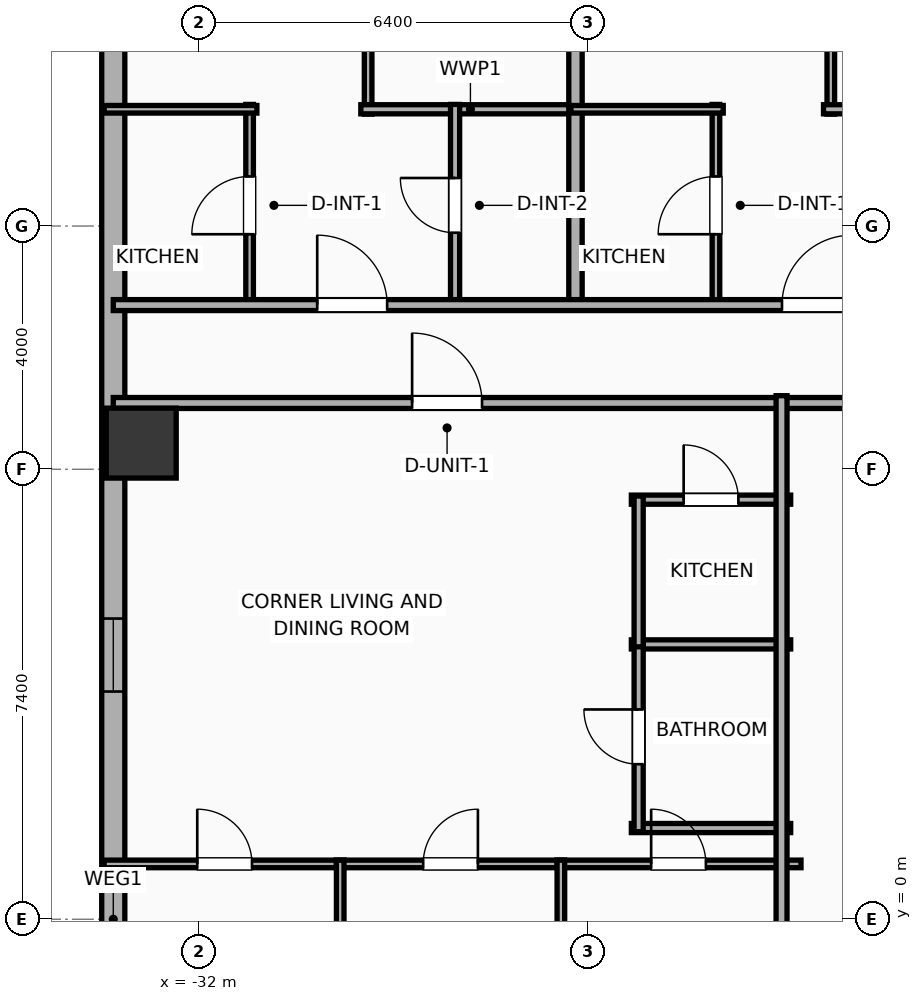
"""IFC4 building model, lengths in metres.
Left out: names, types, materials, properties, quantities, classifications, styles, units other than length and angle.
Written with IfcOpenShell. Run it as: python <this file> out.ifc"""

import sys

from ifc_helpers import new_model, si_unit, direction, frame, frame_2d, origin, origin_2d, place, context, subcontext, project, spatial, rectangle, hollow_rectangle, extrude, element, fill, save


model = new_model("IFC4")
c1 = context("Model", 3, precision=1e-05, world=origin(), true_north=direction((0.0, 1.0)))
c2 = subcontext(c1, "Body", "Model", "MODEL_VIEW")
j1 = project(units=[si_unit("LENGTHUNIT", "METRE"), si_unit("PLANEANGLEUNIT", "RADIAN")], contexts=[c1])
p1 = place(None, origin())
s1 = spatial("IfcSite", under=j1, at=p1, CompositionType="ELEMENT")
p2 = place(p1, origin())
s2 = spatial("IfcBuilding", under=s1, at=p2, CompositionType="ELEMENT")
p3 = place(p2, frame((0.0, 0.0, 45.5)))
s3 = spatial("IfcBuildingStorey", under=s2, at=p3, CompositionType="ELEMENT", Elevation=45.5)
p4 = place(p3, frame((-32.95, 7.83, 0.0), z_axis=(0.0, 0.0, 1.0), x_axis=(1.0, 0.0, 0.0)))
e1 = element("IfcColumn", 1, at=p4, inside=s3, PredefinedType="COLUMN", context=c2, shape_type="SweptSolid", body=[
    extrude(hollow_rectangle(XDim=1.15, YDim=1.15, WallThickness=0.04, at=origin_2d()), origin(), (0.0, 0.0, 1.0), 3.9),
])
p5 = place(p3, frame((-33.41, -18.381, 0.0), z_axis=(0.0, 0.0, 1.0), x_axis=(0.0, 1.0, 0.0)))
e2 = element("IfcWall", 2, at=p5, inside=s3, PredefinedType="ELEMENTEDWALL", context=c2, shape_type="SweptSolid", body=[
    extrude(rectangle(XDim=36.763, YDim=0.38, at=frame_2d((18.381, 0.0))), origin(), (0.0, 0.0, 1.0), 3.65),
])
p6 = place(p5, frame((33.187, 0.0, 0.75)))
e3 = element("IfcOpeningElement", 3, at=p6, cuts=e2, PredefinedType="OPENING", context=c2, shape_type="SweptSolid", body=[
    extrude(rectangle(XDim=1.2, YDim=2.05, at=frame_2d((0.6, 1.025))), frame((0.0, 0.2, 0.0), z_axis=(0.0, -1.0, 0.0), x_axis=(1.0, 0.0, 0.0)), (0.0, 0.0, 1.0), 0.4),
])
p7 = place(p5, frame((22.126, 0.0, 0.75)))
e4 = element("IfcOpeningElement", 4, at=p7, cuts=e2, PredefinedType="OPENING", context=c2, shape_type="SweptSolid", body=[
    extrude(rectangle(XDim=1.2, YDim=2.05, at=frame_2d((0.6, 1.025))), frame((0.0, 0.2, 0.0), z_axis=(0.0, -1.0, 0.0), x_axis=(1.0, 0.0, 0.0)), (0.0, 0.0, 1.0), 0.4),
])
p8 = place(p5, frame((13.576, 0.0, 0.75)))
e5 = element("IfcOpeningElement", 5, at=p8, cuts=e2, PredefinedType="OPENING", context=c2, shape_type="SweptSolid", body=[
    extrude(rectangle(XDim=1.2, YDim=2.05, at=frame_2d((0.6, 1.025))), frame((0.0, 0.2, 0.0), z_axis=(0.0, -1.0, 0.0), x_axis=(1.0, 0.0, 0.0)), (0.0, 0.0, 1.0), 0.4),
])
p9 = place(p3, frame((-33.41, 8.49, 0.0), z_axis=(0.0, 0.0, 1.0), x_axis=(1.0, 0.0, 0.0)))
e6 = element("IfcWall", 6, at=p9, inside=s3, PredefinedType="PARTITIONING", context=c2, shape_type="SweptSolid", body=[
    extrude(rectangle(XDim=23.53, YDim=0.18, at=frame_2d((11.765, 0.0))), origin(), (0.0, 0.0, 1.0), 3.65),
])
p10 = place(p9, frame((4.915, 0.0, 0.0)))
e7 = element("IfcOpeningElement", 7, at=p10, cuts=e6, PredefinedType="OPENING", context=c2, shape_type="SweptSolid", body=[
    extrude(rectangle(XDim=1.15, YDim=2.05, at=frame_2d((0.575, 1.025))), frame((0.0, 0.1, 0.0), z_axis=(0.0, -1.0, 0.0), x_axis=(1.0, 0.0, 0.0)), (0.0, 0.0, 1.0), 0.2),
])
p11 = place(p3, frame((-29.219, 13.24, 0.0), z_axis=(0.0, 0.0, 1.0), x_axis=(0.0, 1.0, 0.0)))
e8 = element("IfcWall", 8, at=p11, inside=s3, PredefinedType="PARTITIONING", context=c2, shape_type="SweptSolid", body=[
    extrude(rectangle(XDim=9.12, YDim=0.125, at=frame_2d((4.56, 0.0))), origin(), (0.0, 0.0, 1.0), 3.65),
])
p12 = place(p11, frame((1.739, 0.0, 0.0)))
e9 = element("IfcOpeningElement", 9, at=p12, cuts=e8, PredefinedType="OPENING", context=c2, shape_type="SweptSolid", body=[
    extrude(rectangle(XDim=0.9, YDim=2.05, at=frame_2d((0.45, 1.025))), frame((0.0, 0.073, 0.0), z_axis=(0.0, -1.0, 0.0), x_axis=(1.0, 0.0, 0.0)), (0.0, 0.0, 1.0), 0.145),
])
p13 = place(p3, frame((-29.339, 13.32, 0.0), z_axis=(0.0, 0.0, 1.0), x_axis=(1.0, 0.0, 0.0)))
e10 = element("IfcWall", 10, at=p13, inside=s3, PredefinedType="PLUMBINGWALL", context=c2, shape_type="SweptSolid", body=[
    extrude(rectangle(XDim=3.605, YDim=0.15, at=frame_2d((1.803, 0.0))), origin(), (0.0, 0.0, 1.0), 3.65),
])
p14 = place(p3, frame((-31.168, 10.08, 0.0), z_axis=(0.0, 0.0, 1.0), x_axis=(0.0, 1.0, 0.0)))
e11 = element("IfcWall", 11, at=p14, inside=s3, PredefinedType="PARTITIONING", context=c2, shape_type="SweptSolid", body=[
    extrude(rectangle(XDim=3.32, YDim=0.125, at=frame_2d((1.66, 0.0))), origin(), (0.0, 0.0, 1.0), 3.65),
])
p15 = place(p14, frame((1.185, 0.0, 0.0)))
e12 = element("IfcOpeningElement", 12, at=p15, cuts=e11, PredefinedType="OPENING", context=c2, shape_type="SweptSolid", body=[
    extrude(rectangle(XDim=0.95, YDim=2.05, at=frame_2d((0.475, 1.025))), frame((0.0, 0.073, 0.0), z_axis=(0.0, -1.0, 0.0), x_axis=(1.0, 0.0, 0.0)), (0.0, 0.0, 1.0), 0.145),
])
p16 = place(p3, frame((-33.56, 13.32, 0.0), z_axis=(0.0, 0.0, 1.0), x_axis=(1.0, 0.0, 0.0)))
e13 = element("IfcWall", 13, at=p16, inside=s3, PredefinedType="PARTITIONING", context=c2, shape_type="SweptSolid", body=[
    extrude(rectangle(XDim=2.512, YDim=0.125, at=frame_2d((1.256, 0.0))), origin(), (0.0, 0.0, 1.0), 3.65),
])
p17 = place(p3, frame((-27.789, 10.08, 0.0), z_axis=(0.0, 0.0, 1.0), x_axis=(0.0, 1.0, 0.0)))
e14 = element("IfcWall", 14, at=p17, inside=s3, PredefinedType="PLUMBINGWALL", context=c2, shape_type="SweptSolid", body=[
    extrude(rectangle(XDim=3.32, YDim=0.15, at=frame_2d((1.66, 0.0))), origin(), (0.0, 0.0, 1.0), 3.65),
])
p18 = place(p17, frame((1.21, 0.0, 0.0)))
e15 = element("IfcOpeningElement", 15, at=p18, cuts=e14, PredefinedType="OPENING", context=c2, shape_type="SweptSolid", body=[
    extrude(rectangle(XDim=0.9, YDim=2.05, at=frame_2d((0.45, 1.025))), frame((0.0, 0.085, 0.0), z_axis=(0.0, -1.0, 0.0), x_axis=(1.0, 0.0, 0.0)), (0.0, 0.0, 1.0), 0.17),
])
p19 = place(p3, frame((-25.809, 10.02, 0.0), z_axis=(0.0, 0.0, 1.0), x_axis=(0.0, 1.0, 0.0)))
e16 = element("IfcWall", 16, at=p19, inside=s3, PredefinedType="PARTITIONING", context=c2, shape_type="SweptSolid", body=[
    extrude(rectangle(XDim=12.19, YDim=0.22, at=frame_2d((6.095, 0.0))), origin(), (0.0, 0.0, 1.0), 3.65),
])
p20 = place(p3, frame((-21.61, 13.24, 0.0), z_axis=(0.0, 0.0, 1.0), x_axis=(0.0, 1.0, 0.0)))
e17 = element("IfcWall", 17, at=p20, inside=s3, PredefinedType="PARTITIONING", context=c2, shape_type="SweptSolid", body=[
    extrude(rectangle(XDim=9.12, YDim=0.125, at=frame_2d((4.56, 0.0))), origin(), (0.0, 0.0, 1.0), 3.65),
])
p21 = place(p20, frame((1.739, 0.0, 0.0)))
e18 = element("IfcOpeningElement", 18, at=p21, cuts=e17, PredefinedType="OPENING", context=c2, shape_type="SweptSolid", body=[
    extrude(rectangle(XDim=0.9, YDim=2.05, at=frame_2d((0.45, 1.025))), frame((0.0, 0.073, 0.0), z_axis=(0.0, -1.0, 0.0), x_axis=(1.0, 0.0, 0.0)), (0.0, 0.0, 1.0), 0.145),
])
p22 = place(p3, frame((-21.73, 13.32, 0.0), z_axis=(0.0, 0.0, 1.0), x_axis=(1.0, 0.0, 0.0)))
e19 = element("IfcWall", 19, at=p22, inside=s3, PredefinedType="PLUMBINGWALL", context=c2, shape_type="SweptSolid", body=[
    extrude(rectangle(XDim=3.605, YDim=0.15, at=frame_2d((1.802, 0.0))), origin(), (0.0, 0.0, 1.0), 3.65),
])
p23 = place(p3, frame((-23.499, 10.08, 0.0), z_axis=(0.0, 0.0, 1.0), x_axis=(0.0, 1.0, 0.0)))
e20 = element("IfcWall", 20, at=p23, inside=s3, PredefinedType="PARTITIONING", context=c2, shape_type="SweptSolid", body=[
    extrude(rectangle(XDim=3.32, YDim=0.125, at=frame_2d((1.66, 0.0))), origin(), (0.0, 0.0, 1.0), 3.65),
])
p24 = place(p23, frame((1.185, 0.0, 0.0)))
e21 = element("IfcOpeningElement", 21, at=p24, cuts=e20, PredefinedType="OPENING", context=c2, shape_type="SweptSolid", body=[
    extrude(rectangle(XDim=0.95, YDim=2.05, at=frame_2d((0.475, 1.025))), frame((0.0, 0.073, 0.0), z_axis=(0.0, -1.0, 0.0), x_axis=(1.0, 0.0, 0.0)), (0.0, 0.0, 1.0), 0.145),
])
p25 = place(p3, frame((-25.884, 13.32, 0.0), z_axis=(0.0, 0.0, 1.0), x_axis=(1.0, 0.0, 0.0)))
e22 = element("IfcWall", 22, at=p25, inside=s3, PredefinedType="PARTITIONING", context=c2, shape_type="SweptSolid", body=[
    extrude(rectangle(XDim=2.505, YDim=0.125, at=frame_2d((1.252, 0.0))), origin(), (0.0, 0.0, 1.0), 3.65),
])
p26 = place(p3, frame((-33.41, 10.1, 0.0), z_axis=(0.0, 0.0, 1.0), x_axis=(1.0, 0.0, 0.0)))
e23 = element("IfcWall", 23, at=p26, inside=s3, PredefinedType="PARTITIONING", context=c2, shape_type="SweptSolid", body=[
    extrude(rectangle(XDim=59.62, YDim=0.18, at=frame_2d((29.81, 0.0))), origin(), (0.0, 0.0, 1.0), 3.65),
])
p27 = place(p26, frame((3.354, 0.0, 0.0)))
e24 = element("IfcOpeningElement", 24, at=p27, cuts=e23, PredefinedType="OPENING", context=c2, shape_type="SweptSolid", body=[
    extrude(rectangle(XDim=1.15, YDim=2.05, at=frame_2d((0.575, 1.025))), frame((0.0, 0.1, 0.0), z_axis=(0.0, -1.0, 0.0), x_axis=(1.0, 0.0, 0.0)), (0.0, 0.0, 1.0), 0.2),
])
p28 = place(p26, frame((10.997, 0.0, 0.0)))
e25 = element("IfcOpeningElement", 25, at=p28, cuts=e23, PredefinedType="OPENING", context=c2, shape_type="SweptSolid", body=[
    extrude(rectangle(XDim=1.15, YDim=2.05, at=frame_2d((0.575, 1.025))), frame((0.0, 0.1, 0.0), z_axis=(0.0, -1.0, 0.0), x_axis=(1.0, 0.0, 0.0)), (0.0, 0.0, 1.0), 0.2),
])
p29 = place(p26, frame((20.232, 0.0, 0.0)))
e26 = element("IfcOpeningElement", 26, at=p29, cuts=e23, PredefinedType="OPENING", context=c2, shape_type="SweptSolid", body=[
    extrude(rectangle(XDim=1.15, YDim=2.05, at=frame_2d((0.575, 1.025))), frame((0.0, 0.1, 0.0), z_axis=(0.0, -1.0, 0.0), x_axis=(1.0, 0.0, 0.0)), (0.0, 0.0, 1.0), 0.2),
])
p30 = place(p26, frame((30.38, 0.0, 0.0)))
e27 = element("IfcOpeningElement", 27, at=p30, cuts=e23, PredefinedType="OPENING", context=c2, shape_type="SweptSolid", body=[
    extrude(rectangle(XDim=1.15, YDim=2.05, at=frame_2d((0.575, 1.025))), frame((0.0, 0.1, 0.0), z_axis=(0.0, -1.0, 0.0), x_axis=(1.0, 0.0, 0.0)), (0.0, 0.0, 1.0), 0.2),
])
p31 = place(p26, frame((40.998, 0.0, 0.0)))
e28 = element("IfcOpeningElement", 28, at=p31, cuts=e23, PredefinedType="OPENING", context=c2, shape_type="SweptSolid", body=[
    extrude(rectangle(XDim=1.15, YDim=2.05, at=frame_2d((0.575, 1.025))), frame((0.0, 0.1, 0.0), z_axis=(0.0, -1.0, 0.0), x_axis=(1.0, 0.0, 0.0)), (0.0, 0.0, 1.0), 0.2),
])
p32 = place(p26, frame((49.428, 0.0, 0.0)))
e29 = element("IfcOpeningElement", 29, at=p32, cuts=e23, PredefinedType="OPENING", context=c2, shape_type="SweptSolid", body=[
    extrude(rectangle(XDim=0.9, YDim=2.05, at=frame_2d((0.45, 1.025))), frame((0.0, 0.1, 0.0), z_axis=(0.0, -1.0, 0.0), x_axis=(1.0, 0.0, 0.0)), (0.0, 0.0, 1.0), 0.2),
])
p33 = place(p26, frame((56.07, 0.0, 0.0)))
e30 = element("IfcOpeningElement", 30, at=p33, cuts=e23, PredefinedType="OPENING", context=c2, shape_type="SweptSolid", body=[
    extrude(rectangle(XDim=0.9, YDim=2.05, at=frame_2d((0.45, 1.025))), frame((0.0, 0.1, 0.0), z_axis=(0.0, -1.0, 0.0), x_axis=(1.0, 0.0, 0.0)), (0.0, 0.0, 1.0), 0.2),
])
p34 = place(p3, frame((-24.89, 6.9, 0.0), z_axis=(0.0, 0.0, 1.0), x_axis=(1.0, 0.0, 0.0)))
e31 = element("IfcWall", 31, at=p34, inside=s3, PredefinedType="PLUMBINGWALL", context=c2, shape_type="SweptSolid", body=[
    extrude(rectangle(XDim=2.62, YDim=0.15, at=frame_2d((1.31, 0.0))), origin(), (0.0, 0.0, 1.0), 3.65),
])
p35 = place(p34, frame((0.86, 0.0, 0.0)))
e32 = element("IfcOpeningElement", 32, at=p35, cuts=e31, PredefinedType="OPENING", context=c2, shape_type="SweptSolid", body=[
    extrude(rectangle(XDim=0.9, YDim=2.05, at=frame_2d((0.45, 1.025))), frame((0.0, 0.085, 0.0), z_axis=(0.0, -1.0, 0.0), x_axis=(1.0, 0.0, 0.0)), (0.0, 0.0, 1.0), 0.17),
])
for number, where, z_axis, x_axis in (
    (33, (-24.89, 4.52, 0.0), (0.0, 0.0, 1.0), (1.0, 0.0, 0.0)),
    (34, (-24.89, 1.5, 0.0), (0.0, 0.0, 1.0), (1.0, 0.0, 0.0)),
):
    element("IfcWall", number, at=place(p3, frame(where, z_axis=z_axis, x_axis=x_axis)), inside=s3, PredefinedType="PLUMBINGWALL", context=c2, shape_type="SweptSolid", body=[
        extrude(rectangle(XDim=2.62, YDim=0.15, at=frame_2d((1.31, 0.0))), origin(), (0.0, 0.0, 1.0), 3.65),
    ])
p36 = place(p3, frame((-24.77, 1.44, 0.0), z_axis=(0.0, 0.0, 1.0), x_axis=(0.0, 1.0, 0.0)))
e35 = element("IfcWall", 35, at=p36, inside=s3, PredefinedType="PLUMBINGWALL", context=c2, shape_type="SweptSolid", body=[
    extrude(rectangle(XDim=3.12, YDim=0.15, at=frame_2d((1.56, 0.0))), origin(), (0.0, 0.0, 1.0), 3.65),
])
p37 = place(p36, frame((1.11, 0.0, 0.0)))
e36 = element("IfcOpeningElement", 36, at=p37, cuts=e35, PredefinedType="OPENING", context=c2, shape_type="SweptSolid", body=[
    extrude(rectangle(XDim=0.9, YDim=2.05, at=frame_2d((0.45, 1.025))), frame((0.0, 0.085, 0.0), z_axis=(0.0, -1.0, 0.0), x_axis=(1.0, 0.0, 0.0)), (0.0, 0.0, 1.0), 0.17),
])
p38 = place(p3, frame((-24.77, 4.48, 0.0), z_axis=(0.0, 0.0, 1.0), x_axis=(0.0, 1.0, 0.0)))
e37 = element("IfcWall", 37, at=p38, inside=s3, PredefinedType="PLUMBINGWALL", context=c2, shape_type="SweptSolid", body=[
    extrude(rectangle(XDim=2.48, YDim=0.15, at=frame_2d((1.24, 0.0))), origin(), (0.0, 0.0, 1.0), 3.65),
])
p39 = place(p3, frame((-33.56, 0.91, 0.0), z_axis=(0.0, 0.0, 1.0), x_axis=(1.0, 0.0, 0.0)))
e38 = element("IfcWall", 38, at=p39, inside=s3, PredefinedType="PARTITIONING", context=c2, shape_type="SweptSolid", body=[
    extrude(rectangle(XDim=3.945, YDim=0.125, at=frame_2d((1.972, 0.0))), origin(), (0.0, 0.0, 1.0), 3.65),
])
p40 = place(p39, frame((1.531, 0.0, 0.0)))
e39 = element("IfcOpeningElement", 39, at=p40, cuts=e38, PredefinedType="OPENING", context=c2, shape_type="SweptSolid", body=[
    extrude(rectangle(XDim=0.9, YDim=2.05, at=frame_2d((0.45, 1.025))), frame((0.0, 0.073, 0.0), z_axis=(0.0, -1.0, 0.0), x_axis=(1.0, 0.0, 0.0)), (0.0, 0.0, 1.0), 0.145),
])
p41 = place(p3, frame((-29.74, 0.91, 0.0), z_axis=(0.0, 0.0, 1.0), x_axis=(1.0, 0.0, 0.0)))
e40 = element("IfcWall", 40, at=p41, inside=s3, PredefinedType="PARTITIONING", context=c2, shape_type="SweptSolid", body=[
    extrude(rectangle(XDim=3.754, YDim=0.125, at=frame_2d((1.877, 0.0))), origin(), (0.0, 0.0, 1.0), 3.65),
])
p42 = place(p41, frame((1.427, 0.0, 0.0)))
e41 = element("IfcOpeningElement", 41, at=p42, cuts=e40, PredefinedType="OPENING", context=c2, shape_type="SweptSolid", body=[
    extrude(rectangle(XDim=0.9, YDim=2.05, at=frame_2d((0.45, 1.025))), frame((0.0, 0.073, 0.0), z_axis=(0.0, -1.0, 0.0), x_axis=(1.0, 0.0, 0.0)), (0.0, 0.0, 1.0), 0.145),
])
p43 = place(p3, frame((-26.112, 0.91, 0.0), z_axis=(0.0, 0.0, 1.0), x_axis=(1.0, 0.0, 0.0)))
e42 = element("IfcWall", 42, at=p43, inside=s3, PredefinedType="PARTITIONING", context=c2, shape_type="SweptSolid", body=[
    extrude(rectangle(XDim=4.011, YDim=0.125, at=frame_2d((2.006, 0.0))), origin(), (0.0, 0.0, 1.0), 3.65),
])
p44 = place(p43, frame((1.547, 0.0, 0.0)))
e43 = element("IfcOpeningElement", 43, at=p44, cuts=e42, PredefinedType="OPENING", context=c2, shape_type="SweptSolid", body=[
    extrude(rectangle(XDim=0.9, YDim=2.05, at=frame_2d((0.45, 1.025))), frame((0.0, 0.073, 0.0), z_axis=(0.0, -1.0, 0.0), x_axis=(1.0, 0.0, 0.0)), (0.0, 0.0, 1.0), 0.145),
])
for number, where, z_axis, x_axis in (
    (44, (-26.049, -8.81, 0.0), (0.0, 0.0, 1.0), (0.0, 1.0, 0.0)),
    (45, (-29.678, -8.81, 0.0), (0.0, 0.0, 1.0), (0.0, 1.0, 0.0)),
):
    element("IfcWall", number, at=place(p3, frame(where, z_axis=z_axis, x_axis=x_axis)), inside=s3, PredefinedType="PARTITIONING", context=c2, shape_type="SweptSolid", body=[
        extrude(rectangle(XDim=9.78, YDim=0.125, at=frame_2d((4.89, 0.0))), origin(), (0.0, 0.0, 1.0), 3.65),
    ])
p45 = place(p3, frame((-22.42, -8.61, 0.0), z_axis=(0.0, 0.0, 1.0), x_axis=(0.0, 1.0, 0.0)))
e46 = element("IfcWall", 46, at=p45, inside=s3, PredefinedType="PARTITIONING", context=c2, shape_type="SweptSolid", body=[
    extrude(rectangle(XDim=17.22, YDim=0.18, at=frame_2d((8.61, 0.0))), origin(), (0.0, 0.0, 1.0), 3.65),
])
p46 = place(p7, origin())
e47 = element("IfcWindow", 47, at=p46, inside=s3, PartitioningType="SINGLE_PANEL", PredefinedType="WINDOW", context=c2, shape_type="SweptSolid", body=[
    extrude(rectangle(XDim=1.2, YDim=2.05, at=frame_2d((0.6, 1.025))), frame((0.0, 0.03, 0.0), z_axis=(0.0, -1.0, 0.0), x_axis=(1.0, 0.0, 0.0)), (0.0, 0.0, 1.0), 0.06),
])
fill(e4, e47)
p47 = place(p10, origin())
e48 = element("IfcDoor", 48, at=p47, inside=s3, OperationType="SINGLE_SWING_LEFT", PredefinedType="DOOR", context=c2, shape_type="SweptSolid", body=[
    extrude(rectangle(XDim=1.15, YDim=2.05, at=frame_2d((0.575, 1.025))), frame((0.0, 0.025, 0.0), z_axis=(0.0, -1.0, 0.0), x_axis=(1.0, 0.0, 0.0)), (0.0, 0.0, 1.0), 0.05),
])
fill(e7, e48)
p48 = place(p15, origin())
e49 = element("IfcDoor", 49, at=p48, inside=s3, OperationType="SINGLE_SWING_LEFT", PredefinedType="DOOR", context=c2, shape_type="SweptSolid", body=[
    extrude(rectangle(XDim=0.95, YDim=2.05, at=frame_2d((0.475, 1.025))), frame((0.0, 0.025, 0.0), z_axis=(0.0, -1.0, 0.0), x_axis=(1.0, 0.0, 0.0)), (0.0, 0.0, 1.0), 0.05),
])
fill(e12, e49)
p49 = place(p18, origin())
e50 = element("IfcDoor", 50, at=p49, inside=s3, OperationType="SINGLE_SWING_RIGHT", PredefinedType="DOOR", context=c2, shape_type="SweptSolid", body=[
    extrude(rectangle(XDim=0.9, YDim=2.05, at=frame_2d((0.45, 1.025))), frame((0.0, 0.025, 0.0), z_axis=(0.0, -1.0, 0.0), x_axis=(1.0, 0.0, 0.0)), (0.0, 0.0, 1.0), 0.05),
])
fill(e15, e50)
p50 = place(p24, origin())
e51 = element("IfcDoor", 51, at=p50, inside=s3, OperationType="SINGLE_SWING_LEFT", PredefinedType="DOOR", context=c2, shape_type="SweptSolid", body=[
    extrude(rectangle(XDim=0.95, YDim=2.05, at=frame_2d((0.475, 1.025))), frame((0.0, 0.025, 0.0), z_axis=(0.0, -1.0, 0.0), x_axis=(1.0, 0.0, 0.0)), (0.0, 0.0, 1.0), 0.05),
])
fill(e21, e51)
p51 = place(p27, origin())
e52 = element("IfcDoor", 52, at=p51, inside=s3, OperationType="SINGLE_SWING_LEFT", PredefinedType="DOOR", context=c2, shape_type="SweptSolid", body=[
    extrude(rectangle(XDim=1.15, YDim=2.05, at=frame_2d((0.575, 1.025))), frame((0.0, 0.025, 0.0), z_axis=(0.0, -1.0, 0.0), x_axis=(1.0, 0.0, 0.0)), (0.0, 0.0, 1.0), 0.05),
])
fill(e24, e52)
p52 = place(p28, origin())
e53 = element("IfcDoor", 53, at=p52, inside=s3, OperationType="SINGLE_SWING_RIGHT", PredefinedType="DOOR", context=c2, shape_type="SweptSolid", body=[
    extrude(rectangle(XDim=1.15, YDim=2.05, at=frame_2d((0.575, 1.025))), frame((0.0, 0.025, 0.0), z_axis=(0.0, -1.0, 0.0), x_axis=(1.0, 0.0, 0.0)), (0.0, 0.0, 1.0), 0.05),
])
fill(e25, e53)
p53 = place(p35, origin())
e54 = element("IfcDoor", 54, at=p53, inside=s3, OperationType="SINGLE_SWING_LEFT", PredefinedType="DOOR", context=c2, shape_type="SweptSolid", body=[
    extrude(rectangle(XDim=0.9, YDim=2.05, at=frame_2d((0.45, 1.025))), frame((0.0, 0.025, 0.0), z_axis=(0.0, -1.0, 0.0), x_axis=(1.0, 0.0, 0.0)), (0.0, 0.0, 1.0), 0.05),
])
fill(e32, e54)
p54 = place(p37, origin())
e55 = element("IfcDoor", 55, at=p54, inside=s3, OperationType="SINGLE_SWING_RIGHT", PredefinedType="DOOR", context=c2, shape_type="SweptSolid", body=[
    extrude(rectangle(XDim=0.9, YDim=2.05, at=frame_2d((0.45, 1.025))), frame((0.0, 0.025, 0.0), z_axis=(0.0, -1.0, 0.0), x_axis=(1.0, 0.0, 0.0)), (0.0, 0.0, 1.0), 0.05),
])
fill(e36, e55)
p55 = place(p40, origin())
e56 = element("IfcDoor", 56, at=p55, inside=s3, OperationType="SINGLE_SWING_LEFT", PredefinedType="DOOR", context=c2, shape_type="SweptSolid", body=[
    extrude(rectangle(XDim=0.9, YDim=2.05, at=frame_2d((0.45, 1.025))), frame((0.0, 0.025, 0.0), z_axis=(0.0, -1.0, 0.0), x_axis=(1.0, 0.0, 0.0)), (0.0, 0.0, 1.0), 0.05),
])
fill(e39, e56)
p56 = place(p42, origin())
e57 = element("IfcDoor", 57, at=p56, inside=s3, OperationType="SINGLE_SWING_RIGHT", PredefinedType="DOOR", context=c2, shape_type="SweptSolid", body=[
    extrude(rectangle(XDim=0.9, YDim=2.05, at=frame_2d((0.45, 1.025))), frame((0.0, 0.025, 0.0), z_axis=(0.0, -1.0, 0.0), x_axis=(1.0, 0.0, 0.0)), (0.0, 0.0, 1.0), 0.05),
])
fill(e41, e57)
p57 = place(p44, origin())
e58 = element("IfcDoor", 58, at=p57, inside=s3, OperationType="SINGLE_SWING_LEFT", PredefinedType="DOOR", context=c2, shape_type="SweptSolid", body=[
    extrude(rectangle(XDim=0.9, YDim=2.05, at=frame_2d((0.45, 1.025))), frame((0.0, 0.025, 0.0), z_axis=(0.0, -1.0, 0.0), x_axis=(1.0, 0.0, 0.0)), (0.0, 0.0, 1.0), 0.05),
])
fill(e43, e58)
save(model, sys.argv[1])
